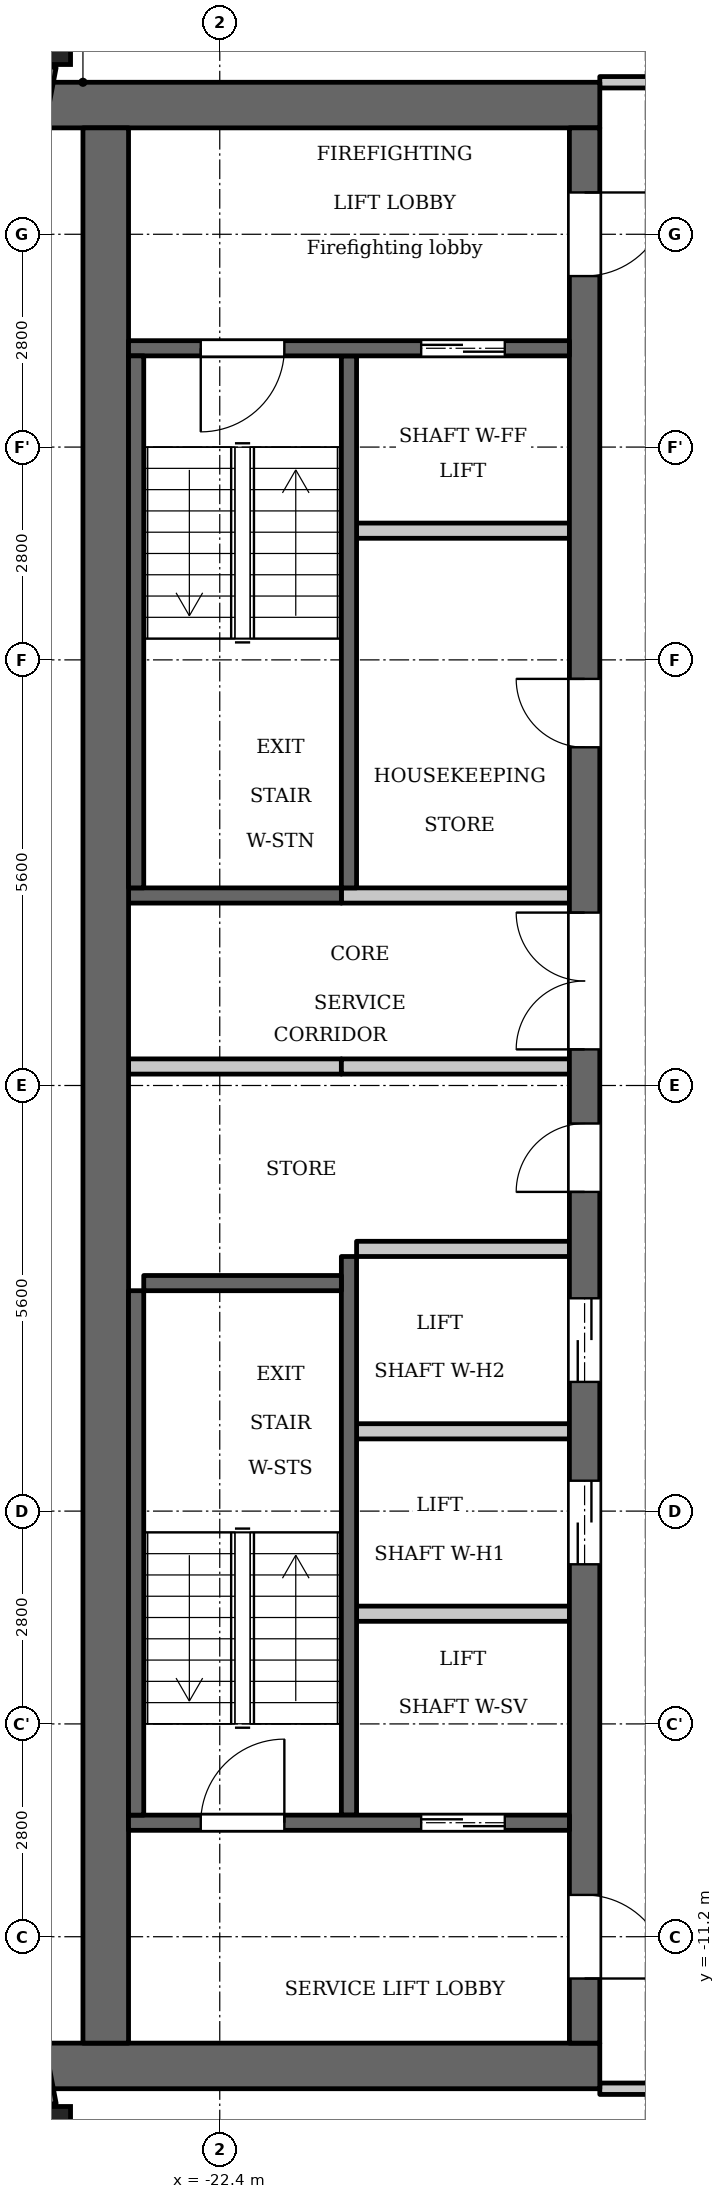
"""IFC4 building model, lengths in metres.
Left out: names, types, materials, properties, quantities, classifications, styles, units other than length and angle.
Written with IfcOpenShell. Run it as: python <this file> out.ifc"""

import sys

from ifc_helpers import new_model, si_unit, direction, frame, frame_2d, origin, origin_2d, place, context, subcontext, project, spatial, rectangle, extrude, element, fill, save


model = new_model("IFC4")
c1 = context("Model", 3, precision=1e-05, world=origin(), true_north=direction((0.0, 1.0)))
c2 = subcontext(c1, "Body", "Model", "MODEL_VIEW")
j1 = project(units=[si_unit("LENGTHUNIT", "METRE"), si_unit("PLANEANGLEUNIT", "RADIAN")], contexts=[c1])
p1 = place(None, origin())
s1 = spatial("IfcSite", under=j1, at=p1, CompositionType="ELEMENT")
p2 = place(p1, origin())
s2 = spatial("IfcBuilding", under=s1, at=p2, CompositionType="ELEMENT")
p3 = place(p2, frame((0.0, 0.0, 273.2)))
s3 = spatial("IfcBuildingStorey", under=s2, at=p3, CompositionType="ELEMENT", Elevation=273.2)
for number, where, z_axis, x_axis in (
    (1, (-24.738, 13.809, 0.0), (0.0, 0.0, 1.0), (1.0, 0.0, 0.0)),
    (2, (-24.738, -13.809, 0.0), (0.0, 0.0, 1.0), (1.0, 0.0, 0.0)),
):
    element("IfcColumn", number, at=place(p3, frame(where, z_axis=z_axis, x_axis=x_axis)), inside=s3, PredefinedType="COLUMN", context=c2, shape_type="SweptSolid", body=[
        extrude(rectangle(XDim=0.75, YDim=0.75, at=origin_2d()), origin(), (0.0, 0.0, 1.0), 3.5),
    ])
for number, where, z_axis, x_axis in (
    (3, (-24.7, 13.42, 0.0), (0.0, 0.0, 1.0), (-0.187, -0.982, 0.0)),
    (4, (-25.053, -11.572, 0.0), (0.0, 0.0, 1.0), (0.187, -0.982, 0.0)),
):
    element("IfcWall", number, at=place(p3, frame(where, z_axis=z_axis, x_axis=x_axis)), inside=s3, PredefinedType="SOLIDWALL", context=c2, shape_type="SweptSolid", body=[
        extrude(rectangle(XDim=1.881, YDim=0.3, at=frame_2d((0.941, 0.0))), origin(), (0.0, 0.0, 1.0), 2.55),
    ])
p4 = place(p3, frame((-20.7, 2.6, 0.0), z_axis=(0.0, 0.0, 1.0), x_axis=(0.0, 1.0, 0.0)))
e5 = element("IfcWall", 5, at=p4, inside=s3, PredefinedType="SHEAR", context=c2, shape_type="SweptSolid", body=[
    extrude(rectangle(XDim=7.0, YDim=0.2, at=frame_2d((3.5, 0.0))), origin(), (0.0, 0.0, 1.0), 3.2),
])
p5 = place(p3, frame((-20.7, -9.6, 0.0), z_axis=(0.0, 0.0, 1.0), x_axis=(0.0, 1.0, 0.0)))
e6 = element("IfcWall", 6, at=p5, inside=s3, PredefinedType="SHEAR", context=c2, shape_type="SweptSolid", body=[
    extrude(rectangle(XDim=7.35, YDim=0.2, at=frame_2d((3.675, 0.0))), origin(), (0.0, 0.0, 1.0), 3.2),
])
p6 = place(p3, frame((-20.8, 2.5, 0.0), z_axis=(0.0, 0.0, 1.0), x_axis=(-1.0, 0.0, 0.0)))
e7 = element("IfcWall", 7, at=p6, inside=s3, PredefinedType="SHEAR", context=c2, shape_type="SweptSolid", body=[
    extrude(rectangle(XDim=2.8, YDim=0.2, at=frame_2d((1.4, 0.0))), origin(), (0.0, 0.0, 1.0), 3.2),
])
p7 = place(p3, frame((-20.8, 0.25, 0.0), z_axis=(0.0, 0.0, 1.0), x_axis=(-1.0, 0.0, 0.0)))
e8 = element("IfcWall", 8, at=p7, inside=s3, PredefinedType="PARTITIONING", context=c2, shape_type="SweptSolid", body=[
    extrude(rectangle(XDim=2.8, YDim=0.2, at=frame_2d((1.4, 0.0))), origin(), (0.0, 0.0, 1.0), 3.2),
])
for number, where, z_axis, x_axis in (
    (9, (-17.4, 12.9, 0.0), (0.0, 0.0, 1.0), (-1.0, 0.0, 0.0)),
    (10, (-17.4, -12.9, 0.0), (0.0, 0.0, 1.0), (-1.0, 0.0, 0.0)),
):
    element("IfcWall", number, at=place(p3, frame(where, z_axis=z_axis, x_axis=x_axis)), inside=s3, PredefinedType="SHEAR", context=c2, shape_type="SweptSolid", body=[
        extrude(rectangle(XDim=7.32, YDim=0.6, at=frame_2d((3.66, 0.0))), origin(), (0.0, 0.0, 1.0), 3.2),
    ])
p8 = place(p3, frame((-17.6, -12.6, 0.0), z_axis=(0.0, 0.0, 1.0), x_axis=(0.0, 1.0, 0.0)))
e11 = element("IfcWall", 11, at=p8, inside=s3, PredefinedType="SHEAR", context=c2, shape_type="SweptSolid", body=[
    extrude(rectangle(XDim=25.2, YDim=0.4, at=frame_2d((12.6, 0.0))), origin(), (0.0, 0.0, 1.0), 3.2),
])
p9 = place(p8, frame((6.3, 0.0, 0.0)))
e12 = element("IfcOpeningElement", 12, at=p9, cuts=e11, PredefinedType="OPENING", context=c2, shape_type="SweptSolid", body=[
    extrude(rectangle(XDim=1.1, YDim=2.1, at=frame_2d((0.55, 1.05))), frame((0.0, 0.21, 0.0), z_axis=(0.0, -1.0, 0.0), x_axis=(1.0, 0.0, 0.0)), (0.0, 0.0, 1.0), 0.42),
])
p10 = place(p8, frame((8.7, 0.0, 0.0)))
e13 = element("IfcOpeningElement", 13, at=p10, cuts=e11, PredefinedType="OPENING", context=c2, shape_type="SweptSolid", body=[
    extrude(rectangle(XDim=1.1, YDim=2.1, at=frame_2d((0.55, 1.05))), frame((0.0, 0.21, 0.0), z_axis=(0.0, -1.0, 0.0), x_axis=(1.0, 0.0, 0.0)), (0.0, 0.0, 1.0), 0.42),
])
p11 = place(p8, frame((11.2, 0.0, 0.0)))
e14 = element("IfcOpeningElement", 14, at=p11, cuts=e11, PredefinedType="OPENING", context=c2, shape_type="SweptSolid", body=[
    extrude(rectangle(XDim=0.9, YDim=2.1, at=frame_2d((0.45, 1.05))), frame((0.0, 0.21, 0.0), z_axis=(0.0, -1.0, 0.0), x_axis=(1.0, 0.0, 0.0)), (0.0, 0.0, 1.0), 0.42),
])
p12 = place(p8, frame((17.05, 0.0, 0.0)))
e15 = element("IfcOpeningElement", 15, at=p12, cuts=e11, PredefinedType="OPENING", context=c2, shape_type="SweptSolid", body=[
    extrude(rectangle(XDim=0.9, YDim=2.1, at=frame_2d((0.45, 1.05))), frame((0.0, 0.21, 0.0), z_axis=(0.0, -1.0, 0.0), x_axis=(1.0, 0.0, 0.0)), (0.0, 0.0, 1.0), 0.42),
])
p13 = place(p8, frame((23.25, 0.0, 0.0)))
e16 = element("IfcOpeningElement", 16, at=p13, cuts=e11, PredefinedType="OPENING", context=c2, shape_type="SweptSolid", body=[
    extrude(rectangle(XDim=1.1, YDim=2.1, at=frame_2d((0.55, 1.05))), frame((0.0, 0.21, 0.0), z_axis=(0.0, -1.0, 0.0), x_axis=(1.0, 0.0, 0.0)), (0.0, 0.0, 1.0), 0.42),
])
p14 = place(p8, frame((0.85, 0.0, 0.0)))
e17 = element("IfcOpeningElement", 17, at=p14, cuts=e11, PredefinedType="OPENING", context=c2, shape_type="SweptSolid", body=[
    extrude(rectangle(XDim=1.1, YDim=2.1, at=frame_2d((0.55, 1.05))), frame((0.0, 0.21, 0.0), z_axis=(0.0, -1.0, 0.0), x_axis=(1.0, 0.0, 0.0)), (0.0, 0.0, 1.0), 0.42),
])
p15 = place(p8, frame((13.075, 0.0, 0.0)))
e18 = element("IfcOpeningElement", 18, at=p15, cuts=e11, PredefinedType="OPENING", context=c2, shape_type="SweptSolid", body=[
    extrude(rectangle(XDim=1.8, YDim=2.1, at=frame_2d((0.9, 1.05))), frame((0.0, 0.21, 0.0), z_axis=(0.0, -1.0, 0.0), x_axis=(1.0, 0.0, 0.0)), (0.0, 0.0, 1.0), 0.42),
])
p16 = place(p3, frame((-23.9, -12.6, 0.0), z_axis=(0.0, 0.0, 1.0), x_axis=(0.0, 1.0, 0.0)))
e19 = element("IfcWall", 19, at=p16, inside=s3, PredefinedType="SHEAR", context=c2, shape_type="SweptSolid", body=[
    extrude(rectangle(XDim=25.2, YDim=0.6, at=frame_2d((12.6, 0.0))), origin(), (0.0, 0.0, 1.0), 3.2),
])
p17 = place(p3, frame((-17.8, -9.7, 0.0), z_axis=(0.0, 0.0, 1.0), x_axis=(-1.0, 0.0, 0.0)))
e20 = element("IfcWall", 20, at=p17, inside=s3, PredefinedType="SHEAR", context=c2, shape_type="SweptSolid", body=[
    extrude(rectangle(XDim=5.8, YDim=0.2, at=frame_2d((2.9, 0.0))), origin(), (0.0, 0.0, 1.0), 3.2),
])
p18 = place(p17, frame((0.85, 0.0, 0.0)))
e21 = element("IfcOpeningElement", 21, at=p18, cuts=e20, PredefinedType="OPENING", context=c2, shape_type="SweptSolid", body=[
    extrude(rectangle(XDim=1.1, YDim=2.1, at=frame_2d((0.55, 1.05))), frame((0.0, 0.11, 0.0), z_axis=(0.0, -1.0, 0.0), x_axis=(1.0, 0.0, 0.0)), (0.0, 0.0, 1.0), 0.22),
])
p19 = place(p17, frame((3.75, 0.0, 0.0)))
e22 = element("IfcOpeningElement", 22, at=p19, cuts=e20, PredefinedType="OPENING", context=c2, shape_type="SweptSolid", body=[
    extrude(rectangle(XDim=1.1, YDim=2.1, at=frame_2d((0.55, 1.05))), frame((0.0, 0.11, 0.0), z_axis=(0.0, -1.0, 0.0), x_axis=(1.0, 0.0, 0.0)), (0.0, 0.0, 1.0), 0.22),
])
for number, where, z_axis, x_axis in (
    (23, (-17.8, -6.95, 0.0), (0.0, 0.0, 1.0), (-1.0, 0.0, 0.0)),
    (24, (-17.8, -4.55, 0.0), (0.0, 0.0, 1.0), (-1.0, 0.0, 0.0)),
    (25, (-17.8, -2.15, 0.0), (0.0, 0.0, 1.0), (-1.0, 0.0, 0.0)),
):
    element("IfcWall", number, at=place(p3, frame(where, z_axis=z_axis, x_axis=x_axis)), inside=s3, PredefinedType="PARTITIONING", context=c2, shape_type="SweptSolid", body=[
        extrude(rectangle(XDim=2.8, YDim=0.2, at=frame_2d((1.4, 0.0))), origin(), (0.0, 0.0, 1.0), 3.2),
    ])
for number, where, z_axis, x_axis in (
    (26, (-17.8, 0.25, 0.0), (0.0, 0.0, 1.0), (-1.0, 0.0, 0.0)),
    (27, (-17.8, 2.5, 0.0), (0.0, 0.0, 1.0), (-1.0, 0.0, 0.0)),
):
    element("IfcWall", number, at=place(p3, frame(where, z_axis=z_axis, x_axis=x_axis)), inside=s3, PredefinedType="PARTITIONING", context=c2, shape_type="SweptSolid", body=[
        extrude(rectangle(XDim=3.0, YDim=0.2, at=frame_2d((1.5, 0.0))), origin(), (0.0, 0.0, 1.0), 3.2),
    ])
p20 = place(p3, frame((-17.8, 7.3, 0.0), z_axis=(0.0, 0.0, 1.0), x_axis=(-1.0, 0.0, 0.0)))
e28 = element("IfcWall", 28, at=p20, inside=s3, PredefinedType="PARTITIONING", context=c2, shape_type="SweptSolid", body=[
    extrude(rectangle(XDim=2.8, YDim=0.2, at=frame_2d((1.4, 0.0))), origin(), (0.0, 0.0, 1.0), 3.2),
])
p21 = place(p3, frame((-17.8, 9.7, 0.0), z_axis=(0.0, 0.0, 1.0), x_axis=(-1.0, 0.0, 0.0)))
e29 = element("IfcWall", 29, at=p21, inside=s3, PredefinedType="SHEAR", context=c2, shape_type="SweptSolid", body=[
    extrude(rectangle(XDim=5.8, YDim=0.2, at=frame_2d((2.9, 0.0))), origin(), (0.0, 0.0, 1.0), 3.2),
])
p22 = place(p21, frame((0.85, 0.0, 0.0)))
e30 = element("IfcOpeningElement", 30, at=p22, cuts=e29, PredefinedType="OPENING", context=c2, shape_type="SweptSolid", body=[
    extrude(rectangle(XDim=1.1, YDim=2.1, at=frame_2d((0.55, 1.05))), frame((0.0, 0.11, 0.0), z_axis=(0.0, -1.0, 0.0), x_axis=(1.0, 0.0, 0.0)), (0.0, 0.0, 1.0), 0.22),
])
p23 = place(p21, frame((3.75, 0.0, 0.0)))
e31 = element("IfcOpeningElement", 31, at=p23, cuts=e29, PredefinedType="OPENING", context=c2, shape_type="SweptSolid", body=[
    extrude(rectangle(XDim=1.1, YDim=2.1, at=frame_2d((0.55, 1.05))), frame((0.0, 0.11, 0.0), z_axis=(0.0, -1.0, 0.0), x_axis=(1.0, 0.0, 0.0)), (0.0, 0.0, 1.0), 0.22),
])
p24 = place(p3, frame((-23.5, 2.6, 0.0), z_axis=(0.0, 0.0, 1.0), x_axis=(0.0, 1.0, 0.0)))
e32 = element("IfcWall", 32, at=p24, inside=s3, PredefinedType="SHEAR", context=c2, shape_type="SweptSolid", body=[
    extrude(rectangle(XDim=7.0, YDim=0.2, at=frame_2d((3.5, 0.0))), origin(), (0.0, 0.0, 1.0), 3.2),
])
p25 = place(p3, frame((-23.5, -9.6, 0.0), z_axis=(0.0, 0.0, 1.0), x_axis=(0.0, 1.0, 0.0)))
e33 = element("IfcWall", 33, at=p25, inside=s3, PredefinedType="SHEAR", context=c2, shape_type="SweptSolid", body=[
    extrude(rectangle(XDim=6.9, YDim=0.2, at=frame_2d((3.45, 0.0))), origin(), (0.0, 0.0, 1.0), 3.2),
])
p26 = place(p3, frame((-20.8, -2.6, 0.0), z_axis=(0.0, 0.0, 1.0), x_axis=(-1.0, 0.0, 0.0)))
e34 = element("IfcWall", 34, at=p26, inside=s3, PredefinedType="SHEAR", context=c2, shape_type="SweptSolid", body=[
    extrude(rectangle(XDim=2.6, YDim=0.2, at=frame_2d((1.3, 0.0))), origin(), (0.0, 0.0, 1.0), 3.2),
])
p27 = place(p3, frame((-17.4, -13.2, 0.0), z_axis=(0.0, 0.0, 1.0), x_axis=(1.0, 0.0, 0.0)))
e35 = element("IfcWall", 35, at=p27, inside=s3, PredefinedType="PARTITIONING", context=c2, shape_type="SweptSolid", body=[
    extrude(rectangle(XDim=2.325, YDim=0.15, at=frame_2d((1.163, 0.0))), origin(), (0.0, 0.0, 1.0), 3.2),
])
p28 = place(p27, frame((0.65, 0.0, 0.0)))
e36 = element("IfcOpeningElement", 36, at=p28, cuts=e35, PredefinedType="OPENING", context=c2, shape_type="SweptSolid", body=[
    extrude(rectangle(XDim=1.0, YDim=2.1, at=frame_2d((0.5, 1.05))), frame((0.0, 0.085, 0.0), z_axis=(0.0, -1.0, 0.0), x_axis=(1.0, 0.0, 0.0)), (0.0, 0.0, 1.0), 0.17),
])
p29 = place(p3, frame((-17.4, 13.2, 0.0), z_axis=(0.0, 0.0, 1.0), x_axis=(1.0, 0.0, 0.0)))
e37 = element("IfcWall", 37, at=p29, inside=s3, PredefinedType="PARTITIONING", context=c2, shape_type="SweptSolid", body=[
    extrude(rectangle(XDim=2.325, YDim=0.15, at=frame_2d((1.163, 0.0))), origin(), (0.0, 0.0, 1.0), 3.2),
])
p30 = place(p29, frame((0.75, 0.0, 0.0)))
e38 = element("IfcOpeningElement", 38, at=p30, cuts=e37, PredefinedType="OPENING", context=c2, shape_type="SweptSolid", body=[
    extrude(rectangle(XDim=1.0, YDim=2.1, at=frame_2d((0.5, 1.05))), frame((0.0, 0.085, 0.0), z_axis=(0.0, -1.0, 0.0), x_axis=(1.0, 0.0, 0.0)), (0.0, 0.0, 1.0), 0.17),
])
p31 = place(p18, origin())
e39 = element("IfcDoor", 39, at=p31, inside=s3, OperationType="DOUBLE_DOOR_SLIDING", PredefinedType="DOOR", context=c2, shape_type="SweptSolid", body=[
    extrude(rectangle(XDim=1.1, YDim=2.1, at=frame_2d((0.55, 1.05))), frame((0.0, 0.025, 0.0), z_axis=(0.0, -1.0, 0.0), x_axis=(1.0, 0.0, 0.0)), (0.0, 0.0, 1.0), 0.05),
])
fill(e21, e39)
p32 = place(p9, origin())
e40 = element("IfcDoor", 40, at=p32, inside=s3, OperationType="DOUBLE_DOOR_SLIDING", PredefinedType="DOOR", context=c2, shape_type="SweptSolid", body=[
    extrude(rectangle(XDim=1.1, YDim=2.1, at=frame_2d((0.55, 1.05))), frame((0.0, 0.025, 0.0), z_axis=(0.0, -1.0, 0.0), x_axis=(1.0, 0.0, 0.0)), (0.0, 0.0, 1.0), 0.05),
])
fill(e12, e40)
p33 = place(p10, origin())
e41 = element("IfcDoor", 41, at=p33, inside=s3, OperationType="DOUBLE_DOOR_SLIDING", PredefinedType="DOOR", context=c2, shape_type="SweptSolid", body=[
    extrude(rectangle(XDim=1.1, YDim=2.1, at=frame_2d((0.55, 1.05))), frame((0.0, 0.025, 0.0), z_axis=(0.0, -1.0, 0.0), x_axis=(1.0, 0.0, 0.0)), (0.0, 0.0, 1.0), 0.05),
])
fill(e13, e41)
p34 = place(p11, origin())
e42 = element("IfcDoor", 42, at=p34, inside=s3, OperationType="SINGLE_SWING_RIGHT", PredefinedType="DOOR", context=c2, shape_type="SweptSolid", body=[
    extrude(rectangle(XDim=0.9, YDim=2.1, at=frame_2d((0.45, 1.05))), frame((0.0, 0.025, 0.0), z_axis=(0.0, -1.0, 0.0), x_axis=(1.0, 0.0, 0.0)), (0.0, 0.0, 1.0), 0.05),
])
fill(e14, e42)
p35 = place(p12, origin())
e43 = element("IfcDoor", 43, at=p35, inside=s3, OperationType="SINGLE_SWING_LEFT", PredefinedType="DOOR", context=c2, shape_type="SweptSolid", body=[
    extrude(rectangle(XDim=0.9, YDim=2.1, at=frame_2d((0.45, 1.05))), frame((0.0, 0.025, 0.0), z_axis=(0.0, -1.0, 0.0), x_axis=(1.0, 0.0, 0.0)), (0.0, 0.0, 1.0), 0.05),
])
fill(e15, e43)
p36 = place(p22, origin())
e44 = element("IfcDoor", 44, at=p36, inside=s3, OperationType="DOUBLE_DOOR_SLIDING", PredefinedType="DOOR", context=c2, shape_type="SweptSolid", body=[
    extrude(rectangle(XDim=1.1, YDim=2.1, at=frame_2d((0.55, 1.05))), frame((0.0, 0.025, 0.0), z_axis=(0.0, -1.0, 0.0), x_axis=(1.0, 0.0, 0.0)), (0.0, 0.0, 1.0), 0.05),
])
fill(e30, e44)
p37 = place(p13, origin())
e45 = element("IfcDoor", 45, at=p37, inside=s3, OperationType="SINGLE_SWING_RIGHT", PredefinedType="DOOR", context=c2, shape_type="SweptSolid", body=[
    extrude(rectangle(XDim=1.1, YDim=2.1, at=frame_2d((0.55, 1.05))), frame((0.0, 0.025, 0.0), z_axis=(0.0, -1.0, 0.0), x_axis=(1.0, 0.0, 0.0)), (0.0, 0.0, 1.0), 0.05),
])
fill(e16, e45)
p38 = place(p14, origin())
e46 = element("IfcDoor", 46, at=p38, inside=s3, OperationType="SINGLE_SWING_LEFT", PredefinedType="DOOR", context=c2, shape_type="SweptSolid", body=[
    extrude(rectangle(XDim=1.1, YDim=2.1, at=frame_2d((0.55, 1.05))), frame((0.0, 0.025, 0.0), z_axis=(0.0, -1.0, 0.0), x_axis=(1.0, 0.0, 0.0)), (0.0, 0.0, 1.0), 0.05),
])
fill(e17, e46)
p39 = place(p23, origin())
e47 = element("IfcDoor", 47, at=p39, inside=s3, OperationType="SINGLE_SWING_LEFT", PredefinedType="DOOR", context=c2, shape_type="SweptSolid", body=[
    extrude(rectangle(XDim=1.1, YDim=2.1, at=frame_2d((0.55, 1.05))), frame((0.0, 0.025, 0.0), z_axis=(0.0, -1.0, 0.0), x_axis=(1.0, 0.0, 0.0)), (0.0, 0.0, 1.0), 0.05),
])
fill(e31, e47)
p40 = place(p19, origin())
e48 = element("IfcDoor", 48, at=p40, inside=s3, OperationType="SINGLE_SWING_LEFT", PredefinedType="DOOR", context=c2, shape_type="SweptSolid", body=[
    extrude(rectangle(XDim=1.1, YDim=2.1, at=frame_2d((0.55, 1.05))), frame((0.0, 0.025, 0.0), z_axis=(0.0, -1.0, 0.0), x_axis=(1.0, 0.0, 0.0)), (0.0, 0.0, 1.0), 0.05),
])
fill(e22, e48)
p41 = place(p15, origin())
e49 = element("IfcDoor", 49, at=p41, inside=s3, OperationType="DOUBLE_DOOR_SINGLE_SWING", PredefinedType="DOOR", context=c2, shape_type="SweptSolid", body=[
    extrude(rectangle(XDim=1.8, YDim=2.1, at=frame_2d((0.9, 1.05))), frame((0.0, 0.025, 0.0), z_axis=(0.0, -1.0, 0.0), x_axis=(1.0, 0.0, 0.0)), (0.0, 0.0, 1.0), 0.05),
])
fill(e18, e49)
save(model, sys.argv[1])
